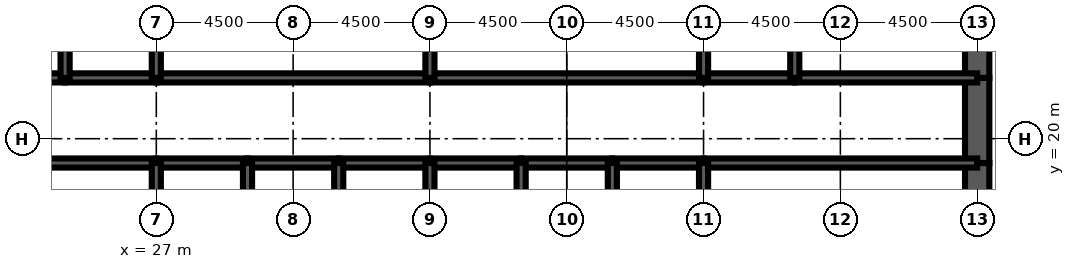
"""IFC4 building model, lengths in metres.
Left out: names, types, materials, properties, quantities, classifications, styles, units other than length and angle.
Written with IfcOpenShell. Run it as: python <this file> out.ifc"""

import sys

from ifc_helpers import new_model, si_unit, direction, frame, frame_2d, origin, place, context, subcontext, project, spatial, rectangle, extrude, element, fill, save


model = new_model("IFC4")
c1 = context("Model", 3, precision=1e-05, world=origin(), true_north=direction((0.0, 1.0)))
c2 = subcontext(c1, "Body", "Model", "MODEL_VIEW")
j1 = project(units=[si_unit("LENGTHUNIT", "METRE"), si_unit("PLANEANGLEUNIT", "RADIAN")], contexts=[c1])
p1 = place(None, origin())
s1 = spatial("IfcSite", under=j1, at=p1, CompositionType="ELEMENT")
p2 = place(p1, origin())
s2 = spatial("IfcBuilding", under=s1, at=p2, CompositionType="ELEMENT")
p3 = place(p2, frame((0.0, 0.0, 253.0)))
s3 = spatial("IfcBuildingStorey", under=s2, at=p3, CompositionType="ELEMENT", Elevation=253.0)
p4 = place(p3, frame((54.0, 16.0, 0.0), z_axis=(0.0, 0.0, 1.0), x_axis=(0.0, 1.0, 0.0)))
e1 = element("IfcWall", 1, at=p4, inside=s3, PredefinedType="SHEAR", context=c2, shape_type="SweptSolid", body=[
    extrude(rectangle(XDim=3.2, YDim=0.8, at=frame_2d((1.6, 0.0))), origin(), (0.0, 0.0, 1.0), 4.2),
])
p5 = place(p3, frame((54.0, 19.2, 0.0), z_axis=(0.0, 0.0, 1.0), x_axis=(0.0, 1.0, 0.0)))
e2 = element("IfcWall", 2, at=p5, inside=s3, PredefinedType="SHEAR", context=c2, shape_type="SweptSolid", body=[
    extrude(rectangle(XDim=2.8, YDim=0.8, at=frame_2d((1.4, 0.0))), origin(), (0.0, 0.0, 1.0), 4.2),
])
p6 = place(p5, frame((0.4, 0.0, 0.0)))
e3 = element("IfcOpeningElement", 3, at=p6, cuts=e2, PredefinedType="OPENING", context=c2, shape_type="SweptSolid", body=[
    extrude(rectangle(XDim=1.8, YDim=2.1, at=frame_2d((0.9, 1.05))), frame((0.0, 0.41, 0.0), z_axis=(0.0, -1.0, 0.0), x_axis=(1.0, 0.0, 0.0)), (0.0, 0.0, 1.0), 0.82),
])
p7 = place(p3, frame((54.0, 22.0, 0.0), z_axis=(0.0, 0.0, 1.0), x_axis=(0.0, 1.0, 0.0)))
e4 = element("IfcWall", 4, at=p7, inside=s3, PredefinedType="SHEAR", context=c2, shape_type="SweptSolid", body=[
    extrude(rectangle(XDim=4.0, YDim=0.8, at=frame_2d((2.0, 0.0))), origin(), (0.0, 0.0, 1.0), 4.2),
])
p8 = place(p3, frame((18.0, 19.2, 0.0), z_axis=(0.0, 0.0, 1.0), x_axis=(1.0, 0.0, 0.0)))
e5 = element("IfcWall", 5, at=p8, inside=s3, PredefinedType="SOLIDWALL", context=c2, shape_type="SweptSolid", body=[
    extrude(rectangle(XDim=9.0, YDim=0.3, at=frame_2d((4.5, 0.0))), origin(), (0.0, 0.0, 1.0), 4.2),
])
p9 = place(p8, frame((0.65, 0.0, 0.0)))
e6 = element("IfcOpeningElement", 6, at=p9, cuts=e5, PredefinedType="OPENING", context=c2, shape_type="SweptSolid", body=[
    extrude(rectangle(XDim=1.0, YDim=2.1, at=frame_2d((0.5, 1.05))), frame((0.0, 0.16, 0.0), z_axis=(0.0, -1.0, 0.0), x_axis=(1.0, 0.0, 0.0)), (0.0, 0.0, 1.0), 0.32),
])
p10 = place(p3, frame((27.0, 19.2, 0.0), z_axis=(0.0, 0.0, 1.0), x_axis=(1.0, 0.0, 0.0)))
e7 = element("IfcWall", 7, at=p10, inside=s3, PredefinedType="SOLIDWALL", context=c2, shape_type="SweptSolid", body=[
    extrude(rectangle(XDim=3.0, YDim=0.3, at=frame_2d((1.5, 0.0))), origin(), (0.0, 0.0, 1.0), 4.2),
])
p11 = place(p10, frame((0.95, 0.0, 0.0)))
e8 = element("IfcOpeningElement", 8, at=p11, cuts=e7, PredefinedType="OPENING", context=c2, shape_type="SweptSolid", body=[
    extrude(rectangle(XDim=1.1, YDim=2.2, at=frame_2d((0.55, 1.1))), frame((0.0, 0.16, 0.0), z_axis=(0.0, -1.0, 0.0), x_axis=(1.0, 0.0, 0.0)), (0.0, 0.0, 1.0), 0.32),
])
p12 = place(p3, frame((30.0, 19.2, 0.0), z_axis=(0.0, 0.0, 1.0), x_axis=(1.0, 0.0, 0.0)))
e9 = element("IfcWall", 9, at=p12, inside=s3, PredefinedType="SOLIDWALL", context=c2, shape_type="SweptSolid", body=[
    extrude(rectangle(XDim=3.0, YDim=0.3, at=frame_2d((1.5, 0.0))), origin(), (0.0, 0.0, 1.0), 4.2),
])
p13 = place(p12, frame((0.95, 0.0, 0.0)))
e10 = element("IfcOpeningElement", 10, at=p13, cuts=e9, PredefinedType="OPENING", context=c2, shape_type="SweptSolid", body=[
    extrude(rectangle(XDim=1.1, YDim=2.2, at=frame_2d((0.55, 1.1))), frame((0.0, 0.16, 0.0), z_axis=(0.0, -1.0, 0.0), x_axis=(1.0, 0.0, 0.0)), (0.0, 0.0, 1.0), 0.32),
])
p14 = place(p3, frame((33.0, 19.2, 0.0), z_axis=(0.0, 0.0, 1.0), x_axis=(1.0, 0.0, 0.0)))
e11 = element("IfcWall", 11, at=p14, inside=s3, PredefinedType="SOLIDWALL", context=c2, shape_type="SweptSolid", body=[
    extrude(rectangle(XDim=3.0, YDim=0.3, at=frame_2d((1.5, 0.0))), origin(), (0.0, 0.0, 1.0), 4.2),
])
p15 = place(p14, frame((0.95, 0.0, 0.0)))
e12 = element("IfcOpeningElement", 12, at=p15, cuts=e11, PredefinedType="OPENING", context=c2, shape_type="SweptSolid", body=[
    extrude(rectangle(XDim=1.1, YDim=2.2, at=frame_2d((0.55, 1.1))), frame((0.0, 0.16, 0.0), z_axis=(0.0, -1.0, 0.0), x_axis=(1.0, 0.0, 0.0)), (0.0, 0.0, 1.0), 0.32),
])
p16 = place(p3, frame((36.0, 19.2, 0.0), z_axis=(0.0, 0.0, 1.0), x_axis=(1.0, 0.0, 0.0)))
e13 = element("IfcWall", 13, at=p16, inside=s3, PredefinedType="SOLIDWALL", context=c2, shape_type="SweptSolid", body=[
    extrude(rectangle(XDim=3.0, YDim=0.3, at=frame_2d((1.5, 0.0))), origin(), (0.0, 0.0, 1.0), 4.2),
])
p17 = place(p16, frame((0.95, 0.0, 0.0)))
e14 = element("IfcOpeningElement", 14, at=p17, cuts=e13, PredefinedType="OPENING", context=c2, shape_type="SweptSolid", body=[
    extrude(rectangle(XDim=1.1, YDim=2.2, at=frame_2d((0.55, 1.1))), frame((0.0, 0.16, 0.0), z_axis=(0.0, -1.0, 0.0), x_axis=(1.0, 0.0, 0.0)), (0.0, 0.0, 1.0), 0.32),
])
p18 = place(p3, frame((39.0, 19.2, 0.0), z_axis=(0.0, 0.0, 1.0), x_axis=(1.0, 0.0, 0.0)))
e15 = element("IfcWall", 15, at=p18, inside=s3, PredefinedType="SOLIDWALL", context=c2, shape_type="SweptSolid", body=[
    extrude(rectangle(XDim=3.0, YDim=0.3, at=frame_2d((1.5, 0.0))), origin(), (0.0, 0.0, 1.0), 4.2),
])
p19 = place(p18, frame((1.0, 0.0, 0.0)))
e16 = element("IfcOpeningElement", 16, at=p19, cuts=e15, PredefinedType="OPENING", context=c2, shape_type="SweptSolid", body=[
    extrude(rectangle(XDim=1.0, YDim=2.1, at=frame_2d((0.5, 1.05))), frame((0.0, 0.16, 0.0), z_axis=(0.0, -1.0, 0.0), x_axis=(1.0, 0.0, 0.0)), (0.0, 0.0, 1.0), 0.32),
])
p20 = place(p3, frame((42.0, 19.2, 0.0), z_axis=(0.0, 0.0, 1.0), x_axis=(1.0, 0.0, 0.0)))
e17 = element("IfcWall", 17, at=p20, inside=s3, PredefinedType="SOLIDWALL", context=c2, shape_type="SweptSolid", body=[
    extrude(rectangle(XDim=3.0, YDim=0.3, at=frame_2d((1.5, 0.0))), origin(), (0.0, 0.0, 1.0), 4.2),
])
p21 = place(p20, frame((1.0, 0.0, 0.0)))
e18 = element("IfcOpeningElement", 18, at=p21, cuts=e17, PredefinedType="OPENING", context=c2, shape_type="SweptSolid", body=[
    extrude(rectangle(XDim=1.0, YDim=2.1, at=frame_2d((0.5, 1.05))), frame((0.0, 0.16, 0.0), z_axis=(0.0, -1.0, 0.0), x_axis=(1.0, 0.0, 0.0)), (0.0, 0.0, 1.0), 0.32),
])
p22 = place(p3, frame((45.0, 19.2, 0.0), z_axis=(0.0, 0.0, 1.0), x_axis=(1.0, 0.0, 0.0)))
e19 = element("IfcWall", 19, at=p22, inside=s3, PredefinedType="SOLIDWALL", context=c2, shape_type="SweptSolid", body=[
    extrude(rectangle(XDim=9.0, YDim=0.3, at=frame_2d((4.5, 0.0))), origin(), (0.0, 0.0, 1.0), 4.2),
])
p23 = place(p22, frame((7.35, 0.0, 0.0)))
e20 = element("IfcOpeningElement", 20, at=p23, cuts=e19, PredefinedType="OPENING", context=c2, shape_type="SweptSolid", body=[
    extrude(rectangle(XDim=1.0, YDim=2.1, at=frame_2d((0.5, 1.05))), frame((0.0, 0.16, 0.0), z_axis=(0.0, -1.0, 0.0), x_axis=(1.0, 0.0, 0.0)), (0.0, 0.0, 1.0), 0.32),
])
p24 = place(p3, frame((18.0, 22.0, 0.0), z_axis=(0.0, 0.0, 1.0), x_axis=(1.0, 0.0, 0.0)))
e21 = element("IfcWall", 21, at=p24, inside=s3, PredefinedType="SOLIDWALL", context=c2, shape_type="SweptSolid", body=[
    extrude(rectangle(XDim=6.0, YDim=0.3, at=frame_2d((3.0, 0.0))), origin(), (0.0, 0.0, 1.0), 4.2),
])
p25 = place(p24, frame((2.0, 0.0, 0.0)))
e22 = element("IfcOpeningElement", 22, at=p25, cuts=e21, PredefinedType="OPENING", context=c2, shape_type="SweptSolid", body=[
    extrude(rectangle(XDim=1.0, YDim=2.1, at=frame_2d((0.5, 1.05))), frame((0.0, 0.16, 0.0), z_axis=(0.0, -1.0, 0.0), x_axis=(1.0, 0.0, 0.0)), (0.0, 0.0, 1.0), 0.32),
])
p26 = place(p3, frame((24.0, 22.0, 0.0), z_axis=(0.0, 0.0, 1.0), x_axis=(1.0, 0.0, 0.0)))
e23 = element("IfcWall", 23, at=p26, inside=s3, PredefinedType="SOLIDWALL", context=c2, shape_type="SweptSolid", body=[
    extrude(rectangle(XDim=3.0, YDim=0.3, at=frame_2d((1.5, 0.0))), origin(), (0.0, 0.0, 1.0), 4.2),
])
p27 = place(p26, frame((1.0, 0.0, 0.0)))
e24 = element("IfcOpeningElement", 24, at=p27, cuts=e23, PredefinedType="OPENING", context=c2, shape_type="SweptSolid", body=[
    extrude(rectangle(XDim=1.0, YDim=2.1, at=frame_2d((0.5, 1.05))), frame((0.0, 0.16, 0.0), z_axis=(0.0, -1.0, 0.0), x_axis=(1.0, 0.0, 0.0)), (0.0, 0.0, 1.0), 0.32),
])
p28 = place(p3, frame((27.0, 22.0, 0.0), z_axis=(0.0, 0.0, 1.0), x_axis=(1.0, 0.0, 0.0)))
e25 = element("IfcWall", 25, at=p28, inside=s3, PredefinedType="SOLIDWALL", context=c2, shape_type="SweptSolid", body=[
    extrude(rectangle(XDim=9.0, YDim=0.3, at=frame_2d((4.5, 0.0))), origin(), (0.0, 0.0, 1.0), 4.2),
])
p29 = place(p28, frame((4.0, 0.0, 0.0)))
e26 = element("IfcOpeningElement", 26, at=p29, cuts=e25, PredefinedType="OPENING", context=c2, shape_type="SweptSolid", body=[
    extrude(rectangle(XDim=1.0, YDim=2.1, at=frame_2d((0.5, 1.05))), frame((0.0, 0.16, 0.0), z_axis=(0.0, -1.0, 0.0), x_axis=(1.0, 0.0, 0.0)), (0.0, 0.0, 1.0), 0.32),
])
p30 = place(p3, frame((36.0, 22.0, 0.0), z_axis=(0.0, 0.0, 1.0), x_axis=(1.0, 0.0, 0.0)))
e27 = element("IfcWall", 27, at=p30, inside=s3, PredefinedType="SOLIDWALL", context=c2, shape_type="SweptSolid", body=[
    extrude(rectangle(XDim=9.0, YDim=0.3, at=frame_2d((4.5, 0.0))), origin(), (0.0, 0.0, 1.0), 4.2),
])
p31 = place(p30, frame((4.0, 0.0, 0.0)))
e28 = element("IfcOpeningElement", 28, at=p31, cuts=e27, PredefinedType="OPENING", context=c2, shape_type="SweptSolid", body=[
    extrude(rectangle(XDim=1.0, YDim=2.1, at=frame_2d((0.5, 1.05))), frame((0.0, 0.16, 0.0), z_axis=(0.0, -1.0, 0.0), x_axis=(1.0, 0.0, 0.0)), (0.0, 0.0, 1.0), 0.32),
])
p32 = place(p3, frame((45.0, 22.0, 0.0), z_axis=(0.0, 0.0, 1.0), x_axis=(1.0, 0.0, 0.0)))
e29 = element("IfcWall", 29, at=p32, inside=s3, PredefinedType="SOLIDWALL", context=c2, shape_type="SweptSolid", body=[
    extrude(rectangle(XDim=3.0, YDim=0.3, at=frame_2d((1.5, 0.0))), origin(), (0.0, 0.0, 1.0), 4.2),
])
p33 = place(p32, frame((1.0, 0.0, 0.0)))
e30 = element("IfcOpeningElement", 30, at=p33, cuts=e29, PredefinedType="OPENING", context=c2, shape_type="SweptSolid", body=[
    extrude(rectangle(XDim=1.0, YDim=2.1, at=frame_2d((0.5, 1.05))), frame((0.0, 0.16, 0.0), z_axis=(0.0, -1.0, 0.0), x_axis=(1.0, 0.0, 0.0)), (0.0, 0.0, 1.0), 0.32),
])
p34 = place(p3, frame((48.0, 22.0, 0.0), z_axis=(0.0, 0.0, 1.0), x_axis=(1.0, 0.0, 0.0)))
e31 = element("IfcWall", 31, at=p34, inside=s3, PredefinedType="SOLIDWALL", context=c2, shape_type="SweptSolid", body=[
    extrude(rectangle(XDim=6.0, YDim=0.3, at=frame_2d((3.0, 0.0))), origin(), (0.0, 0.0, 1.0), 4.2),
])
p35 = place(p34, frame((2.0, 0.0, 0.0)))
e32 = element("IfcOpeningElement", 32, at=p35, cuts=e31, PredefinedType="OPENING", context=c2, shape_type="SweptSolid", body=[
    extrude(rectangle(XDim=1.0, YDim=2.1, at=frame_2d((0.5, 1.05))), frame((0.0, 0.16, 0.0), z_axis=(0.0, -1.0, 0.0), x_axis=(1.0, 0.0, 0.0)), (0.0, 0.0, 1.0), 0.32),
])
p36 = place(p34, frame((4.2, 0.0, 0.0)))
e33 = element("IfcOpeningElement", 33, at=p36, cuts=e31, PredefinedType="OPENING", context=c2, shape_type="SweptSolid", body=[
    extrude(rectangle(XDim=1.0, YDim=2.1, at=frame_2d((0.5, 1.05))), frame((0.0, 0.16, 0.0), z_axis=(0.0, -1.0, 0.0), x_axis=(1.0, 0.0, 0.0)), (0.0, 0.0, 1.0), 0.32),
])
for number, where, z_axis, x_axis in (
    (34, (27.0, 16.0, 0.0), (0.0, 0.0, 1.0), (0.0, 1.0, 0.0)),
    (35, (30.0, 16.0, 0.0), (0.0, 0.0, 1.0), (0.0, 1.0, 0.0)),
    (36, (33.0, 16.0, 0.0), (0.0, 0.0, 1.0), (0.0, 1.0, 0.0)),
    (37, (36.0, 16.0, 0.0), (0.0, 0.0, 1.0), (0.0, 1.0, 0.0)),
    (38, (39.0, 16.0, 0.0), (0.0, 0.0, 1.0), (0.0, 1.0, 0.0)),
    (39, (42.0, 16.0, 0.0), (0.0, 0.0, 1.0), (0.0, 1.0, 0.0)),
    (40, (45.0, 16.0, 0.0), (0.0, 0.0, 1.0), (0.0, 1.0, 0.0)),
):
    element("IfcWall", number, at=place(p3, frame(where, z_axis=z_axis, x_axis=x_axis)), inside=s3, PredefinedType="SOLIDWALL", context=c2, shape_type="SweptSolid", body=[
        extrude(rectangle(XDim=3.2, YDim=0.3, at=frame_2d((1.6, 0.0))), origin(), (0.0, 0.0, 1.0), 4.2),
    ])
for number, where, z_axis, x_axis in (
    (41, (24.0, 22.0, 0.0), (0.0, 0.0, 1.0), (0.0, 1.0, 0.0)),
    (42, (27.0, 22.0, 0.0), (0.0, 0.0, 1.0), (0.0, 1.0, 0.0)),
    (43, (36.0, 22.0, 0.0), (0.0, 0.0, 1.0), (0.0, 1.0, 0.0)),
    (44, (45.0, 22.0, 0.0), (0.0, 0.0, 1.0), (0.0, 1.0, 0.0)),
    (45, (48.0, 22.0, 0.0), (0.0, 0.0, 1.0), (0.0, 1.0, 0.0)),
):
    element("IfcWall", number, at=place(p3, frame(where, z_axis=z_axis, x_axis=x_axis)), inside=s3, PredefinedType="SOLIDWALL", context=c2, shape_type="SweptSolid", body=[
        extrude(rectangle(XDim=4.0, YDim=0.3, at=frame_2d((2.0, 0.0))), origin(), (0.0, 0.0, 1.0), 4.2),
    ])
p37 = place(p3, frame((42.5, 22.15, 0.0), z_axis=(0.0, 0.0, 1.0), x_axis=(0.0, 1.0, 0.0)))
e46 = element("IfcWall", 46, at=p37, inside=s3, PredefinedType="PARTITIONING", context=c2, shape_type="SweptSolid", body=[
    extrude(rectangle(XDim=3.7, YDim=0.15, at=frame_2d((1.85, 0.0))), origin(), (0.0, 0.0, 1.0), 3.0),
])
p38 = place(p37, frame((2.2, 0.0, 0.0)))
e47 = element("IfcOpeningElement", 47, at=p38, cuts=e46, PredefinedType="OPENING", context=c2, shape_type="SweptSolid", body=[
    extrude(rectangle(XDim=1.0, YDim=2.1, at=frame_2d((0.5, 1.05))), frame((0.0, 0.085, 0.0), z_axis=(0.0, -1.0, 0.0), x_axis=(1.0, 0.0, 0.0)), (0.0, 0.0, 1.0), 0.17),
])
p39 = place(p3, frame((51.725, 22.15, 0.0), z_axis=(0.0, 0.0, 1.0), x_axis=(0.0, 1.0, 0.0)))
e48 = element("IfcWall", 48, at=p39, inside=s3, PredefinedType="PARTITIONING", context=c2, shape_type="SweptSolid", body=[
    extrude(rectangle(XDim=3.7, YDim=0.15, at=frame_2d((1.85, 0.0))), origin(), (0.0, 0.0, 1.0), 3.0),
])
p40 = place(p3, frame((24.5, 19.35, 0.0), z_axis=(0.0, 0.0, 1.0), x_axis=(0.0, 1.0, 0.0)))
e49 = element("IfcWall", 49, at=p40, inside=s3, PredefinedType="PARTITIONING", context=c2, shape_type="SweptSolid", body=[
    extrude(rectangle(XDim=2.5, YDim=0.15, at=frame_2d((1.25, 0.0))), origin(), (0.0, 0.0, 1.0), 3.0),
])
p41 = place(p40, frame((1.15, 0.0, 0.0)))
e50 = element("IfcOpeningElement", 50, at=p41, cuts=e49, PredefinedType="OPENING", context=c2, shape_type="SweptSolid", body=[
    extrude(rectangle(XDim=1.0, YDim=2.1, at=frame_2d((0.5, 1.05))), frame((0.0, 0.085, 0.0), z_axis=(0.0, -1.0, 0.0), x_axis=(1.0, 0.0, 0.0)), (0.0, 0.0, 1.0), 0.17),
])
p42 = place(p41, origin())
e51 = element("IfcDoor", 51, at=p42, inside=s3, OperationType="SINGLE_SWING_RIGHT", PredefinedType="DOOR", context=c2, shape_type="SweptSolid", body=[
    extrude(rectangle(XDim=1.0, YDim=2.1, at=frame_2d((0.5, 1.05))), frame((0.0, 0.025, 0.0), z_axis=(0.0, -1.0, 0.0), x_axis=(1.0, 0.0, 0.0)), (0.0, 0.0, 1.0), 0.05),
])
fill(e50, e51)
p43 = place(p11, origin())
e52 = element("IfcDoor", 52, at=p43, inside=s3, OperationType="DOUBLE_DOOR_SLIDING", PredefinedType="USERDEFINED", context=c2, shape_type="SweptSolid", body=[
    extrude(rectangle(XDim=1.1, YDim=2.2, at=frame_2d((0.55, 1.1))), frame((0.0, 0.025, 0.0), z_axis=(0.0, -1.0, 0.0), x_axis=(1.0, 0.0, 0.0)), (0.0, 0.0, 1.0), 0.05),
])
fill(e8, e52)
p44 = place(p13, origin())
e53 = element("IfcDoor", 53, at=p44, inside=s3, OperationType="DOUBLE_DOOR_SLIDING", PredefinedType="USERDEFINED", context=c2, shape_type="SweptSolid", body=[
    extrude(rectangle(XDim=1.1, YDim=2.2, at=frame_2d((0.55, 1.1))), frame((0.0, 0.025, 0.0), z_axis=(0.0, -1.0, 0.0), x_axis=(1.0, 0.0, 0.0)), (0.0, 0.0, 1.0), 0.05),
])
fill(e10, e53)
p45 = place(p15, origin())
e54 = element("IfcDoor", 54, at=p45, inside=s3, OperationType="DOUBLE_DOOR_SLIDING", PredefinedType="USERDEFINED", context=c2, shape_type="SweptSolid", body=[
    extrude(rectangle(XDim=1.1, YDim=2.2, at=frame_2d((0.55, 1.1))), frame((0.0, 0.025, 0.0), z_axis=(0.0, -1.0, 0.0), x_axis=(1.0, 0.0, 0.0)), (0.0, 0.0, 1.0), 0.05),
])
fill(e12, e54)
p46 = place(p17, origin())
e55 = element("IfcDoor", 55, at=p46, inside=s3, OperationType="DOUBLE_DOOR_SLIDING", PredefinedType="USERDEFINED", context=c2, shape_type="SweptSolid", body=[
    extrude(rectangle(XDim=1.1, YDim=2.2, at=frame_2d((0.55, 1.1))), frame((0.0, 0.025, 0.0), z_axis=(0.0, -1.0, 0.0), x_axis=(1.0, 0.0, 0.0)), (0.0, 0.0, 1.0), 0.05),
])
fill(e14, e55)
p47 = place(p23, origin())
e56 = element("IfcDoor", 56, at=p47, inside=s3, OperationType="SINGLE_SWING_RIGHT", PredefinedType="DOOR", context=c2, shape_type="SweptSolid", body=[
    extrude(rectangle(XDim=1.0, YDim=2.1, at=frame_2d((0.5, 1.05))), frame((0.0, 0.025, 0.0), z_axis=(0.0, -1.0, 0.0), x_axis=(1.0, 0.0, 0.0)), (0.0, 0.0, 1.0), 0.05),
])
fill(e20, e56)
p48 = place(p6, origin())
e57 = element("IfcDoor", 57, at=p48, inside=s3, OperationType="SINGLE_SWING_LEFT", PredefinedType="DOOR", context=c2, shape_type="SweptSolid", body=[
    extrude(rectangle(XDim=1.8, YDim=2.1, at=frame_2d((0.9, 1.05))), frame((0.0, 0.4, 0.0), z_axis=(0.0, -1.0, 0.0), x_axis=(1.0, 0.0, 0.0)), (0.0, 0.0, 1.0), 0.8),
])
fill(e3, e57)
p49 = place(p27, origin())
e58 = element("IfcDoor", 58, at=p49, inside=s3, OperationType="SINGLE_SWING_LEFT", PredefinedType="DOOR", context=c2, shape_type="SweptSolid", body=[
    extrude(rectangle(XDim=1.0, YDim=2.1, at=frame_2d((0.5, 1.05))), frame((0.0, 0.025, 0.0), z_axis=(0.0, -1.0, 0.0), x_axis=(1.0, 0.0, 0.0)), (0.0, 0.0, 1.0), 0.05),
])
fill(e24, e58)
p50 = place(p29, origin())
e59 = element("IfcDoor", 59, at=p50, inside=s3, OperationType="SINGLE_SWING_LEFT", PredefinedType="DOOR", context=c2, shape_type="SweptSolid", body=[
    extrude(rectangle(XDim=1.0, YDim=2.1, at=frame_2d((0.5, 1.05))), frame((0.0, 0.025, 0.0), z_axis=(0.0, -1.0, 0.0), x_axis=(1.0, 0.0, 0.0)), (0.0, 0.0, 1.0), 0.05),
])
fill(e26, e59)
p51 = place(p31, origin())
e60 = element("IfcDoor", 60, at=p51, inside=s3, OperationType="SINGLE_SWING_LEFT", PredefinedType="DOOR", context=c2, shape_type="SweptSolid", body=[
    extrude(rectangle(XDim=1.0, YDim=2.1, at=frame_2d((0.5, 1.05))), frame((0.0, 0.025, 0.0), z_axis=(0.0, -1.0, 0.0), x_axis=(1.0, 0.0, 0.0)), (0.0, 0.0, 1.0), 0.05),
])
fill(e28, e60)
p52 = place(p33, origin())
e61 = element("IfcDoor", 61, at=p52, inside=s3, OperationType="SINGLE_SWING_LEFT", PredefinedType="DOOR", context=c2, shape_type="SweptSolid", body=[
    extrude(rectangle(XDim=1.0, YDim=2.1, at=frame_2d((0.5, 1.05))), frame((0.0, 0.025, 0.0), z_axis=(0.0, -1.0, 0.0), x_axis=(1.0, 0.0, 0.0)), (0.0, 0.0, 1.0), 0.05),
])
fill(e30, e61)
p53 = place(p35, origin())
e62 = element("IfcDoor", 62, at=p53, inside=s3, OperationType="SINGLE_SWING_LEFT", PredefinedType="DOOR", context=c2, shape_type="SweptSolid", body=[
    extrude(rectangle(XDim=1.0, YDim=2.1, at=frame_2d((0.5, 1.05))), frame((0.0, 0.025, 0.0), z_axis=(0.0, -1.0, 0.0), x_axis=(1.0, 0.0, 0.0)), (0.0, 0.0, 1.0), 0.05),
])
fill(e32, e62)
p54 = place(p36, origin())
e63 = element("IfcDoor", 63, at=p54, inside=s3, OperationType="SINGLE_SWING_RIGHT", PredefinedType="DOOR", context=c2, shape_type="SweptSolid", body=[
    extrude(rectangle(XDim=1.0, YDim=2.1, at=frame_2d((0.5, 1.05))), frame((0.0, 0.025, 0.0), z_axis=(0.0, -1.0, 0.0), x_axis=(1.0, 0.0, 0.0)), (0.0, 0.0, 1.0), 0.05),
])
fill(e33, e63)
p55 = place(p19, origin())
e64 = element("IfcDoor", 64, at=p55, inside=s3, OperationType="SINGLE_SWING_LEFT", PredefinedType="DOOR", context=c2, shape_type="SweptSolid", body=[
    extrude(rectangle(XDim=1.0, YDim=2.1, at=frame_2d((0.5, 1.05))), frame((0.0, 0.025, 0.0), z_axis=(0.0, -1.0, 0.0), x_axis=(1.0, 0.0, 0.0)), (0.0, 0.0, 1.0), 0.05),
])
fill(e16, e64)
p56 = place(p21, origin())
e65 = element("IfcDoor", 65, at=p56, inside=s3, OperationType="SINGLE_SWING_LEFT", PredefinedType="DOOR", context=c2, shape_type="SweptSolid", body=[
    extrude(rectangle(XDim=1.0, YDim=2.1, at=frame_2d((0.5, 1.05))), frame((0.0, 0.025, 0.0), z_axis=(0.0, -1.0, 0.0), x_axis=(1.0, 0.0, 0.0)), (0.0, 0.0, 1.0), 0.05),
])
fill(e18, e65)
save(model, sys.argv[1])
